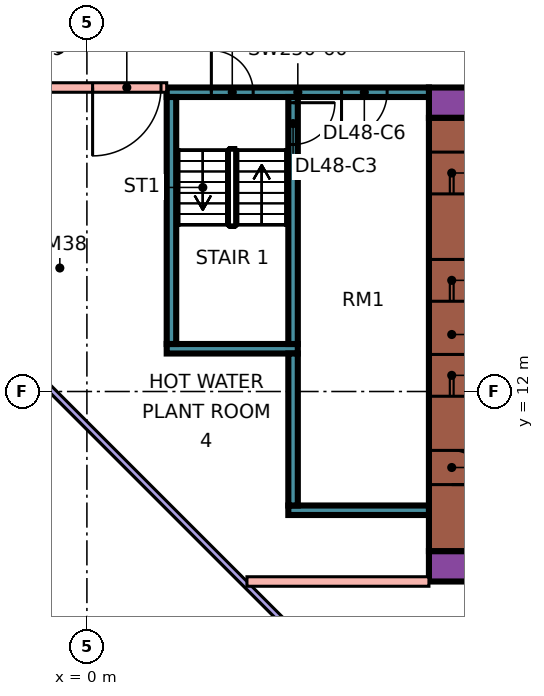
"""IFC4 building model, lengths in metres.
Left out: names, types, materials, properties, quantities, classifications, styles, units other than length and angle.
Written with IfcOpenShell. Run it as: python <this file> out.ifc"""

import sys

from ifc_helpers import new_model, si_unit, direction, frame, frame_2d, origin, place, context, subcontext, project, spatial, rectangle, extrude, element, fill, save


model = new_model("IFC4")
c1 = context("Model", 3, precision=1e-05, world=origin(), true_north=direction((0.0, 1.0)))
c2 = subcontext(c1, "Body", "Model", "MODEL_VIEW")
j1 = project(units=[si_unit("LENGTHUNIT", "METRE"), si_unit("PLANEANGLEUNIT", "RADIAN")], contexts=[c1])
p1 = place(None, origin())
s1 = spatial("IfcSite", under=j1, at=p1, CompositionType="ELEMENT")
p2 = place(p1, origin())
s2 = spatial("IfcBuilding", under=s1, at=p2, CompositionType="ELEMENT")
p3 = place(p2, frame((0.0, 0.0, 206.15)))
s3 = spatial("IfcBuildingStorey", under=s2, at=p3, CompositionType="ELEMENT", Elevation=206.15)
p4 = place(p3, frame((9.0, 7.4, 0.0), z_axis=(0.0, 0.0, 1.0), x_axis=(1.0, 0.0, 0.0)))
e1 = element("IfcWall", 1, at=p4, inside=s3, PredefinedType="SHEAR", context=c2, shape_type="SweptSolid", body=[
    extrude(rectangle(XDim=25.0, YDim=0.8, at=frame_2d((12.5, 0.0))), origin(), (0.0, 0.0, 1.0), 5.5),
])
p5 = place(p3, frame((9.0, 19.6, 0.0), z_axis=(0.0, 0.0, 1.0), x_axis=(1.0, 0.0, 0.0)))
e2 = element("IfcWall", 2, at=p5, inside=s3, PredefinedType="SHEAR", context=c2, shape_type="SweptSolid", body=[
    extrude(rectangle(XDim=25.0, YDim=0.8, at=frame_2d((12.5, 0.0))), origin(), (0.0, 0.0, 1.0), 5.5),
])
p6 = place(p5, frame((19.1, 0.0, 0.0)))
e3 = element("IfcOpeningElement", 3, at=p6, cuts=e2, PredefinedType="OPENING", context=c2, shape_type="SweptSolid", body=[
    extrude(rectangle(XDim=1.8, YDim=2.4, at=frame_2d((0.9, 1.2))), frame((0.0, 0.41, 0.0), z_axis=(0.0, -1.0, 0.0), x_axis=(1.0, 0.0, 0.0)), (0.0, 0.0, 1.0), 0.82),
])
p7 = place(p3, frame((9.6, 7.8, 0.0), z_axis=(0.0, 0.0, 1.0), x_axis=(0.0, 1.0, 0.0)))
e4 = element("IfcWall", 4, at=p7, inside=s3, PredefinedType="SHEAR", context=c2, shape_type="SweptSolid", body=[
    extrude(rectangle(XDim=11.4, YDim=1.2, at=frame_2d((5.7, 0.0))), origin(), (0.0, 0.0, 1.0), 5.5),
])
p8 = place(p7, frame((4.075, 0.0, 0.0)))
e5 = element("IfcOpeningElement", 5, at=p8, cuts=e4, PredefinedType="OPENING", context=c2, shape_type="SweptSolid", body=[
    extrude(rectangle(XDim=1.1, YDim=2.2, at=frame_2d((0.55, 1.1))), frame((0.0, 0.61, 0.0), z_axis=(0.0, -1.0, 0.0), x_axis=(1.0, 0.0, 0.0)), (0.0, 0.0, 1.0), 1.22),
])
p9 = place(p7, frame((6.575, 0.0, 0.0)))
e6 = element("IfcOpeningElement", 6, at=p9, cuts=e4, PredefinedType="OPENING", context=c2, shape_type="SweptSolid", body=[
    extrude(rectangle(XDim=1.1, YDim=2.2, at=frame_2d((0.55, 1.1))), frame((0.0, 0.61, 0.0), z_axis=(0.0, -1.0, 0.0), x_axis=(1.0, 0.0, 0.0)), (0.0, 0.0, 1.0), 1.22),
])
p10 = place(p7, frame((9.4, 0.0, 0.0)))
e7 = element("IfcOpeningElement", 7, at=p10, cuts=e4, PredefinedType="OPENING", context=c2, shape_type="SweptSolid", body=[
    extrude(rectangle(XDim=1.1, YDim=2.2, at=frame_2d((0.55, 1.1))), frame((0.0, 0.61, 0.0), z_axis=(0.0, -1.0, 0.0), x_axis=(1.0, 0.0, 0.0)), (0.0, 0.0, 1.0), 1.22),
])
p11 = place(p7, frame((1.75, 0.0, 0.0)))
e8 = element("IfcOpeningElement", 8, at=p11, cuts=e4, PredefinedType="OPENING", context=c2, shape_type="SweptSolid", body=[
    extrude(rectangle(XDim=0.9, YDim=2.1, at=frame_2d((0.45, 1.05))), frame((0.0, 0.61, 0.0), z_axis=(0.0, -1.0, 0.0), x_axis=(1.0, 0.0, 0.0)), (0.0, 0.0, 1.0), 1.22),
])
p12 = place(p3, frame((2.1, 19.875, 0.0), z_axis=(0.0, 0.0, 1.0), x_axis=(1.0, 0.0, 0.0)))
e9 = element("IfcWall", 9, at=p12, inside=s3, PredefinedType="SHEAR", context=c2, shape_type="SweptSolid", body=[
    extrude(rectangle(XDim=6.9, YDim=0.25, at=frame_2d((3.45, 0.0))), origin(), (0.0, 0.0, 1.0), 5.5),
])
p13 = place(p12, frame((1.175, 0.0, 0.0)))
e10 = element("IfcOpeningElement", 10, at=p13, cuts=e9, PredefinedType="OPENING", context=c2, shape_type="SweptSolid", body=[
    extrude(rectangle(XDim=1.1, YDim=2.2, at=frame_2d((0.55, 1.1))), frame((0.0, 0.135, 0.0), z_axis=(0.0, -1.0, 0.0), x_axis=(1.0, 0.0, 0.0)), (0.0, 0.0, 1.0), 0.27),
])
p14 = place(p12, frame((4.6, 0.0, 0.0)))
e11 = element("IfcOpeningElement", 11, at=p14, cuts=e9, PredefinedType="OPENING", context=c2, shape_type="SweptSolid", body=[
    extrude(rectangle(XDim=1.2, YDim=2.2, at=frame_2d((0.6, 1.1))), frame((0.0, 0.135, 0.0), z_axis=(0.0, -1.0, 0.0), x_axis=(1.0, 0.0, 0.0)), (0.0, 0.0, 1.0), 0.27),
])
p15 = place(p3, frame((2.1, 13.125, 0.0), z_axis=(0.0, 0.0, 1.0), x_axis=(1.0, 0.0, 0.0)))
e12 = element("IfcWall", 12, at=p15, inside=s3, PredefinedType="SHEAR", context=c2, shape_type="SweptSolid", body=[
    extrude(rectangle(XDim=3.45, YDim=0.25, at=frame_2d((1.725, 0.0))), origin(), (0.0, 0.0, 1.0), 5.5),
])
p16 = place(p3, frame((2.225, 13.25, 0.0), z_axis=(0.0, 0.0, 1.0), x_axis=(0.0, 1.0, 0.0)))
e13 = element("IfcWall", 13, at=p16, inside=s3, PredefinedType="SHEAR", context=c2, shape_type="SweptSolid", body=[
    extrude(rectangle(XDim=6.5, YDim=0.25, at=frame_2d((3.25, 0.0))), origin(), (0.0, 0.0, 1.0), 5.5),
])
p17 = place(p3, frame((5.425, 13.25, 0.0), z_axis=(0.0, 0.0, 1.0), x_axis=(0.0, 1.0, 0.0)))
e14 = element("IfcWall", 14, at=p17, inside=s3, PredefinedType="SHEAR", context=c2, shape_type="SweptSolid", body=[
    extrude(rectangle(XDim=6.5, YDim=0.25, at=frame_2d((3.25, 0.0))), origin(), (0.0, 0.0, 1.0), 5.5),
])
p18 = place(p17, frame((5.25, 0.0, 0.0)))
e15 = element("IfcOpeningElement", 15, at=p18, cuts=e14, PredefinedType="OPENING", context=c2, shape_type="SweptSolid", body=[
    extrude(rectangle(XDim=1.1, YDim=2.2, at=frame_2d((0.55, 1.1))), frame((0.0, 0.135, 0.0), z_axis=(0.0, -1.0, 0.0), x_axis=(1.0, 0.0, 0.0)), (0.0, 0.0, 1.0), 0.27),
])
p19 = place(p3, frame((5.3, 8.875, 0.0), z_axis=(0.0, 0.0, 1.0), x_axis=(1.0, 0.0, 0.0)))
e16 = element("IfcWall", 16, at=p19, inside=s3, PredefinedType="SHEAR", context=c2, shape_type="SweptSolid", body=[
    extrude(rectangle(XDim=3.7, YDim=0.25, at=frame_2d((1.85, 0.0))), origin(), (0.0, 0.0, 1.0), 5.5),
])
p20 = place(p3, frame((5.425, 9.0, 0.0), z_axis=(0.0, 0.0, 1.0), x_axis=(0.0, 1.0, 0.0)))
e17 = element("IfcWall", 17, at=p20, inside=s3, PredefinedType="SHEAR", context=c2, shape_type="SweptSolid", body=[
    extrude(rectangle(XDim=4.0, YDim=0.25, at=frame_2d((2.0, 0.0))), origin(), (0.0, 0.0, 1.0), 5.5),
])
p21 = place(p3, frame((-1.447, 12.553, 0.0), z_axis=(0.0, 0.0, 1.0), x_axis=(0.707106781187, -0.707106781187, 0.0)))
e18 = element("IfcWall", 18, at=p21, inside=s3, PredefinedType="SOLIDWALL", context=c2, shape_type="SweptSolid", body=[
    extrude(rectangle(XDim=19.799, YDim=0.15, at=frame_2d((9.899, 0.0))), origin(), (0.0, 0.0, 1.0), 5.1),
])
p22 = place(p21, frame((11.453, 0.0, 0.45)))
e19 = element("IfcOpeningElement", 19, at=p22, cuts=e18, PredefinedType="OPENING", context=c2, shape_type="SweptSolid", body=[
    extrude(rectangle(XDim=3.0, YDim=3.6, at=frame_2d((1.5, 1.8))), frame((0.0, 0.085, 0.0), z_axis=(0.0, -1.0, 0.0), x_axis=(1.0, 0.0, 0.0)), (0.0, 0.0, 1.0), 0.17),
])
p23 = place(p3, frame((-1.35, 20.0, 0.0), z_axis=(0.0, 0.0, 1.0), x_axis=(1.0, 0.0, 0.0)))
e20 = element("IfcWall", 20, at=p23, inside=s3, PredefinedType="PARTITIONING", context=c2, shape_type="SweptSolid", body=[
    extrude(rectangle(XDim=3.45, YDim=0.25, at=frame_2d((1.725, 0.0))), origin(), (0.0, 0.0, 1.0), 5.1),
])
p24 = place(p23, frame((1.5, 0.0, 0.0)))
e21 = element("IfcOpeningElement", 21, at=p24, cuts=e20, PredefinedType="OPENING", context=c2, shape_type="SweptSolid", body=[
    extrude(rectangle(XDim=1.8, YDim=2.1, at=frame_2d((0.9, 1.05))), frame((0.0, 0.135, 0.0), z_axis=(0.0, -1.0, 0.0), x_axis=(1.0, 0.0, 0.0)), (0.0, 0.0, 1.0), 0.27),
])
p25 = place(p3, frame((4.211, 7.0, 0.0), z_axis=(0.0, 0.0, 1.0), x_axis=(1.0, 0.0, 0.0)))
e22 = element("IfcWall", 22, at=p25, inside=s3, PredefinedType="PARTITIONING", context=c2, shape_type="SweptSolid", body=[
    extrude(rectangle(XDim=4.789, YDim=0.25, at=frame_2d((2.395, 0.0))), origin(), (0.0, 0.0, 1.0), 5.1),
])
p26 = place(p8, origin())
e23 = element("IfcDoor", 23, at=p26, inside=s3, OperationType="DOUBLE_DOOR_SLIDING", PredefinedType="DOOR", context=c2, shape_type="SweptSolid", body=[
    extrude(rectangle(XDim=1.1, YDim=2.2, at=frame_2d((0.55, 1.1))), frame((0.0, 0.025, 0.0), z_axis=(0.0, -1.0, 0.0), x_axis=(1.0, 0.0, 0.0)), (0.0, 0.0, 1.0), 0.05),
])
fill(e5, e23)
p27 = place(p9, origin())
e24 = element("IfcDoor", 24, at=p27, inside=s3, OperationType="DOUBLE_DOOR_SLIDING", PredefinedType="DOOR", context=c2, shape_type="SweptSolid", body=[
    extrude(rectangle(XDim=1.1, YDim=2.2, at=frame_2d((0.55, 1.1))), frame((0.0, 0.025, 0.0), z_axis=(0.0, -1.0, 0.0), x_axis=(1.0, 0.0, 0.0)), (0.0, 0.0, 1.0), 0.05),
])
fill(e6, e24)
p28 = place(p10, origin())
e25 = element("IfcDoor", 25, at=p28, inside=s3, OperationType="DOUBLE_DOOR_SLIDING", PredefinedType="DOOR", context=c2, shape_type="SweptSolid", body=[
    extrude(rectangle(XDim=1.1, YDim=2.2, at=frame_2d((0.55, 1.1))), frame((0.0, 0.025, 0.0), z_axis=(0.0, -1.0, 0.0), x_axis=(1.0, 0.0, 0.0)), (0.0, 0.0, 1.0), 0.05),
])
fill(e7, e25)
p29 = place(p18, origin())
e26 = element("IfcDoor", 26, at=p29, inside=s3, OperationType="SINGLE_SWING_RIGHT", PredefinedType="DOOR", context=c2, shape_type="SweptSolid", body=[
    extrude(rectangle(XDim=1.1, YDim=2.2, at=frame_2d((0.55, 1.1))), frame((0.0, 0.025, 0.0), z_axis=(0.0, -1.0, 0.0), x_axis=(1.0, 0.0, 0.0)), (0.0, 0.0, 1.0), 0.05),
])
fill(e15, e26)
p30 = place(p11, frame((0.9, 0.0, 0.0), z_axis=(0.0, 0.0, 1.0), x_axis=(-1.0, 0.0, 0.0)))
e27 = element("IfcDoor", 27, at=p30, inside=s3, OperationType="SINGLE_SWING_LEFT", PredefinedType="DOOR", context=c2, shape_type="SweptSolid", body=[
    extrude(rectangle(XDim=0.9, YDim=2.1, at=frame_2d((0.45, 1.05))), frame((0.0, 0.025, 0.0), z_axis=(0.0, -1.0, 0.0), x_axis=(1.0, 0.0, 0.0)), (0.0, 0.0, 1.0), 0.05),
])
fill(e8, e27)
p31 = place(p13, origin())
e28 = element("IfcDoor", 28, at=p31, inside=s3, OperationType="SINGLE_SWING_LEFT", PredefinedType="DOOR", context=c2, shape_type="SweptSolid", body=[
    extrude(rectangle(XDim=1.1, YDim=2.2, at=frame_2d((0.55, 1.1))), frame((0.0, 0.025, 0.0), z_axis=(0.0, -1.0, 0.0), x_axis=(1.0, 0.0, 0.0)), (0.0, 0.0, 1.0), 0.05),
])
fill(e10, e28)
p32 = place(p14, frame((1.2, 0.0, 0.0), z_axis=(0.0, 0.0, 1.0), x_axis=(-1.0, 0.0, 0.0)))
e29 = element("IfcDoor", 29, at=p32, inside=s3, OperationType="SINGLE_SWING_LEFT", PredefinedType="DOOR", context=c2, shape_type="SweptSolid", body=[
    extrude(rectangle(XDim=1.2, YDim=2.2, at=frame_2d((0.6, 1.1))), frame((0.0, 0.025, 0.0), z_axis=(0.0, -1.0, 0.0), x_axis=(1.0, 0.0, 0.0)), (0.0, 0.0, 1.0), 0.05),
])
fill(e11, e29)
p33 = place(p24, frame((1.8, 0.0, 0.0), z_axis=(0.0, 0.0, 1.0), x_axis=(-1.0, 0.0, 0.0)))
e30 = element("IfcDoor", 30, at=p33, inside=s3, OperationType="DOUBLE_DOOR_SINGLE_SWING", PredefinedType="DOOR", context=c2, shape_type="SweptSolid", body=[
    extrude(rectangle(XDim=1.8, YDim=2.1, at=frame_2d((0.9, 1.05))), frame((0.0, 0.025, 0.0), z_axis=(0.0, -1.0, 0.0), x_axis=(1.0, 0.0, 0.0)), (0.0, 0.0, 1.0), 0.05),
])
fill(e21, e30)
save(model, sys.argv[1])
